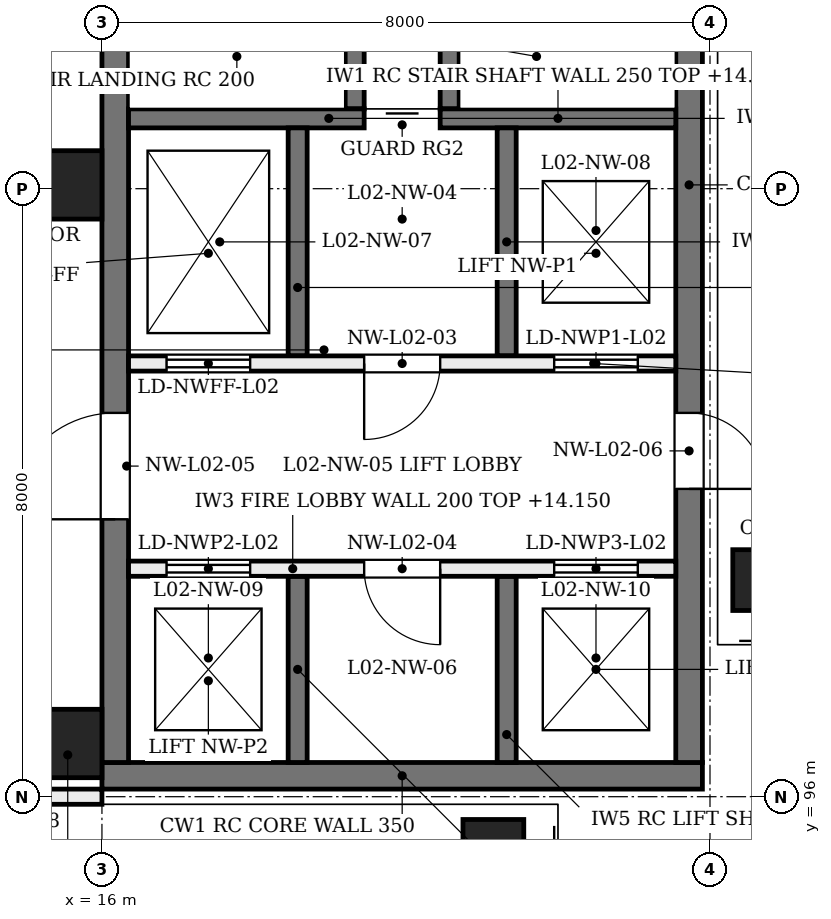
"""IFC4 building model, lengths in metres.
Left out: names, types, materials, properties, quantities, classifications, styles, units other than length and angle.
Written with IfcOpenShell. Run it as: python <this file> out.ifc"""

import sys

from ifc_helpers import new_model, si_unit, direction, frame, frame_2d, origin, origin_2d, place, context, subcontext, project, spatial, rectangle, extrude, element, fill, save


model = new_model("IFC4")
c1 = context("Model", 3, precision=1e-05, world=origin(), true_north=direction((0.0, 1.0)))
c2 = subcontext(c1, "Body", "Model", "MODEL_VIEW")
j1 = project(units=[si_unit("LENGTHUNIT", "METRE"), si_unit("PLANEANGLEUNIT", "RADIAN")], contexts=[c1])
p1 = place(None, origin())
s1 = spatial("IfcSite", under=j1, at=p1, CompositionType="ELEMENT")
p2 = place(p1, origin())
s2 = spatial("IfcBuilding", under=s1, at=p2, CompositionType="ELEMENT")
p3 = place(p2, frame((0.0, 0.0, 9.6)))
s3 = spatial("IfcBuildingStorey", under=s2, at=p3, CompositionType="ELEMENT", Elevation=9.6)
p4 = place(p3, frame((16.0, 96.275, 0.0), z_axis=(0.0, 0.0, 1.0), x_axis=(1.0, 0.0, 0.0)))
e1 = element("IfcWall", 1, at=p4, inside=s3, PredefinedType="SHEAR", context=c2, shape_type="SweptSolid", body=[
    extrude(rectangle(XDim=7.9, YDim=0.35, at=frame_2d((3.95, 0.0))), origin(), (0.0, 0.0, 1.0), 4.58),
])
p5 = place(p3, frame((16.175, 96.45, 0.0), z_axis=(0.0, 0.0, 1.0), x_axis=(0.0, 1.0, 0.0)))
e2 = element("IfcWall", 2, at=p5, inside=s3, PredefinedType="SHEAR", context=c2, shape_type="SweptSolid", body=[
    extrude(rectangle(XDim=15.2, YDim=0.35, at=frame_2d((7.6, 0.0))), origin(), (0.0, 0.0, 1.0), 4.58),
])
p6 = place(p5, frame((13.25, 0.0, 0.0)))
e3 = element("IfcOpeningElement", 3, at=p6, cuts=e2, PredefinedType="OPENING", context=c2, shape_type="SweptSolid", body=[
    extrude(rectangle(XDim=1.0, YDim=2.1, at=frame_2d((0.5, 1.05))), frame((0.0, 0.185, 0.0), z_axis=(0.0, -1.0, 0.0), x_axis=(1.0, 0.0, 0.0)), (0.0, 0.0, 1.0), 0.37),
])
p7 = place(p5, frame((3.2, 0.0, 0.0)))
e4 = element("IfcOpeningElement", 4, at=p7, cuts=e2, PredefinedType="OPENING", context=c2, shape_type="SweptSolid", body=[
    extrude(rectangle(XDim=1.4, YDim=2.1, at=frame_2d((0.7, 1.05))), frame((0.0, 0.185, 0.0), z_axis=(0.0, -1.0, 0.0), x_axis=(1.0, 0.0, 0.0)), (0.0, 0.0, 1.0), 0.37),
])
p8 = place(p3, frame((23.725, 96.45, 0.0), z_axis=(0.0, 0.0, 1.0), x_axis=(0.0, 1.0, 0.0)))
e5 = element("IfcWall", 5, at=p8, inside=s3, PredefinedType="SHEAR", context=c2, shape_type="SweptSolid", body=[
    extrude(rectangle(XDim=15.2, YDim=0.35, at=frame_2d((7.6, 0.0))), origin(), (0.0, 0.0, 1.0), 4.58),
])
p9 = place(p8, frame((13.25, 0.0, 0.0)))
e6 = element("IfcOpeningElement", 6, at=p9, cuts=e5, PredefinedType="OPENING", context=c2, shape_type="SweptSolid", body=[
    extrude(rectangle(XDim=1.0, YDim=2.1, at=frame_2d((0.5, 1.05))), frame((0.0, 0.185, 0.0), z_axis=(0.0, -1.0, 0.0), x_axis=(1.0, 0.0, 0.0)), (0.0, 0.0, 1.0), 0.37),
])
p10 = place(p8, frame((3.6, 0.0, 0.0)))
e7 = element("IfcOpeningElement", 7, at=p10, cuts=e5, PredefinedType="OPENING", context=c2, shape_type="SweptSolid", body=[
    extrude(rectangle(XDim=1.0, YDim=2.1, at=frame_2d((0.5, 1.05))), frame((0.0, 0.185, 0.0), z_axis=(0.0, -1.0, 0.0), x_axis=(1.0, 0.0, 0.0)), (0.0, 0.0, 1.0), 0.37),
])
for number, where, z_axis, x_axis in (
    (8, (15.55, 96.7, 0.0), (0.0, 0.0, 1.0), (1.0, 0.0, 0.0)),
    (9, (15.55, 104.05, 0.0), (0.0, 0.0, 1.0), (1.0, 0.0, 0.0)),
):
    element("IfcColumn", number, at=place(p3, frame(where, z_axis=z_axis, x_axis=x_axis)), inside=s3, PredefinedType="COLUMN", context=c2, shape_type="SweptSolid", body=[
        extrude(rectangle(XDim=0.9, YDim=0.9, at=origin_2d()), origin(), (0.0, 0.0, 1.0), 4.8),
    ])
for number, where, z_axis, x_axis in (
    (10, (24.7, 98.6, 0.0), (0.0, 0.204, 0.979), (-1.0, 0.0, 0.0)),
    (11, (24.7, 106.0, 0.0), (0.0, 0.204, 0.979), (-1.0, 0.0, 0.0)),
    (12, (21.4, 95.3, 0.0), (-0.204, 0.0, 0.979), (0.0, -1.0, 0.0)),
):
    element("IfcColumn", number, at=place(p3, frame(where, z_axis=z_axis, x_axis=x_axis)), inside=s3, PredefinedType="COLUMN", context=c2, shape_type="SweptSolid", body=[
        extrude(rectangle(XDim=0.8, YDim=0.8, at=origin_2d()), origin(), (0.0, 0.0, 1.0), 4.903),
    ])
for number, where, z_axis, x_axis in (
    (13, (19.325, 111.65, 0.0), (0.0, 0.0, 1.0), (0.0, -1.0, 0.0)),
    (14, (20.575, 111.65, 0.0), (0.0, 0.0, 1.0), (0.0, -1.0, 0.0)),
):
    element("IfcWall", number, at=place(p3, frame(where, z_axis=z_axis, x_axis=x_axis)), inside=s3, PredefinedType="SOLIDWALL", context=c2, shape_type="SweptSolid", body=[
        extrude(rectangle(XDim=6.6, YDim=0.25, at=frame_2d((3.3, 0.0))), origin(), (0.0, 0.0, 1.0), 4.55),
    ])
p11 = place(p3, frame((16.35, 104.925, 0.0), z_axis=(0.0, 0.0, 1.0), x_axis=(1.0, 0.0, 0.0)))
e15 = element("IfcWall", 15, at=p11, inside=s3, PredefinedType="SOLIDWALL", context=c2, shape_type="SweptSolid", body=[
    extrude(rectangle(XDim=3.1, YDim=0.25, at=frame_2d((1.55, 0.0))), origin(), (0.0, 0.0, 1.0), 4.55),
])
p12 = place(p3, frame((20.45, 104.925, 0.0), z_axis=(0.0, 0.0, 1.0), x_axis=(1.0, 0.0, 0.0)))
e16 = element("IfcWall", 16, at=p12, inside=s3, PredefinedType="SOLIDWALL", context=c2, shape_type="SweptSolid", body=[
    extrude(rectangle(XDim=3.1, YDim=0.25, at=frame_2d((1.55, 0.0))), origin(), (0.0, 0.0, 1.0), 4.55),
])
p13 = place(p3, frame((18.575, 104.8, 0.0), z_axis=(0.0, 0.0, 1.0), x_axis=(0.0, -1.0, 0.0)))
e17 = element("IfcWall", 17, at=p13, inside=s3, PredefinedType="SOLIDWALL", context=c2, shape_type="SweptSolid", body=[
    extrude(rectangle(XDim=3.0, YDim=0.25, at=frame_2d((1.5, 0.0))), origin(), (0.0, 0.0, 1.0), 4.55),
])
p14 = place(p3, frame((18.575, 98.9, 0.0), z_axis=(0.0, 0.0, 1.0), x_axis=(0.0, -1.0, 0.0)))
e18 = element("IfcWall", 18, at=p14, inside=s3, PredefinedType="SOLIDWALL", context=c2, shape_type="SweptSolid", body=[
    extrude(rectangle(XDim=2.45, YDim=0.25, at=frame_2d((1.225, 0.0))), origin(), (0.0, 0.0, 1.0), 4.55),
])
p15 = place(p3, frame((21.325, 104.8, 0.0), z_axis=(0.0, 0.0, 1.0), x_axis=(0.0, -1.0, 0.0)))
e19 = element("IfcWall", 19, at=p15, inside=s3, PredefinedType="SOLIDWALL", context=c2, shape_type="SweptSolid", body=[
    extrude(rectangle(XDim=3.0, YDim=0.25, at=frame_2d((1.5, 0.0))), origin(), (0.0, 0.0, 1.0), 4.55),
])
p16 = place(p3, frame((21.325, 98.9, 0.0), z_axis=(0.0, 0.0, 1.0), x_axis=(0.0, -1.0, 0.0)))
e20 = element("IfcWall", 20, at=p16, inside=s3, PredefinedType="SOLIDWALL", context=c2, shape_type="SweptSolid", body=[
    extrude(rectangle(XDim=2.45, YDim=0.25, at=frame_2d((1.225, 0.0))), origin(), (0.0, 0.0, 1.0), 4.55),
])
p17 = place(p3, frame((16.35, 101.7, 0.0), z_axis=(0.0, 0.0, 1.0), x_axis=(1.0, 0.0, 0.0)))
e21 = element("IfcWall", 21, at=p17, inside=s3, PredefinedType="SOLIDWALL", context=c2, shape_type="SweptSolid", body=[
    extrude(rectangle(XDim=7.2, YDim=0.2, at=frame_2d((3.6, 0.0))), origin(), (0.0, 0.0, 1.0), 4.55),
])
p18 = place(p17, frame((0.5, 0.0, 0.0)))
e22 = element("IfcOpeningElement", 22, at=p18, cuts=e21, PredefinedType="OPENING", context=c2, shape_type="SweptSolid", body=[
    extrude(rectangle(XDim=1.1, YDim=2.1, at=frame_2d((0.55, 1.05))), frame((0.0, 0.11, 0.0), z_axis=(0.0, -1.0, 0.0), x_axis=(1.0, 0.0, 0.0)), (0.0, 0.0, 1.0), 0.22),
])
p19 = place(p17, frame((5.6, 0.0, 0.0)))
e23 = element("IfcOpeningElement", 23, at=p19, cuts=e21, PredefinedType="OPENING", context=c2, shape_type="SweptSolid", body=[
    extrude(rectangle(XDim=1.1, YDim=2.1, at=frame_2d((0.55, 1.05))), frame((0.0, 0.11, 0.0), z_axis=(0.0, -1.0, 0.0), x_axis=(1.0, 0.0, 0.0)), (0.0, 0.0, 1.0), 0.22),
])
p20 = place(p17, frame((3.1, 0.0, 0.0)))
e24 = element("IfcOpeningElement", 24, at=p20, cuts=e21, PredefinedType="OPENING", context=c2, shape_type="SweptSolid", body=[
    extrude(rectangle(XDim=1.0, YDim=2.1, at=frame_2d((0.5, 1.05))), frame((0.0, 0.11, 0.0), z_axis=(0.0, -1.0, 0.0), x_axis=(1.0, 0.0, 0.0)), (0.0, 0.0, 1.0), 0.22),
])
p21 = place(p3, frame((16.35, 99.0, 0.0), z_axis=(0.0, 0.0, 1.0), x_axis=(1.0, 0.0, 0.0)))
e25 = element("IfcWall", 25, at=p21, inside=s3, PredefinedType="SOLIDWALL", context=c2, shape_type="SweptSolid", body=[
    extrude(rectangle(XDim=7.2, YDim=0.2, at=frame_2d((3.6, 0.0))), origin(), (0.0, 0.0, 1.0), 4.55),
])
p22 = place(p21, frame((0.5, 0.0, 0.0)))
e26 = element("IfcOpeningElement", 26, at=p22, cuts=e25, PredefinedType="OPENING", context=c2, shape_type="SweptSolid", body=[
    extrude(rectangle(XDim=1.1, YDim=2.1, at=frame_2d((0.55, 1.05))), frame((0.0, 0.11, 0.0), z_axis=(0.0, -1.0, 0.0), x_axis=(1.0, 0.0, 0.0)), (0.0, 0.0, 1.0), 0.22),
])
p23 = place(p21, frame((5.6, 0.0, 0.0)))
e27 = element("IfcOpeningElement", 27, at=p23, cuts=e25, PredefinedType="OPENING", context=c2, shape_type="SweptSolid", body=[
    extrude(rectangle(XDim=1.1, YDim=2.1, at=frame_2d((0.55, 1.05))), frame((0.0, 0.11, 0.0), z_axis=(0.0, -1.0, 0.0), x_axis=(1.0, 0.0, 0.0)), (0.0, 0.0, 1.0), 0.22),
])
p24 = place(p21, frame((3.1, 0.0, 0.0)))
e28 = element("IfcOpeningElement", 28, at=p24, cuts=e25, PredefinedType="OPENING", context=c2, shape_type="SweptSolid", body=[
    extrude(rectangle(XDim=1.0, YDim=2.1, at=frame_2d((0.5, 1.05))), frame((0.0, 0.11, 0.0), z_axis=(0.0, -1.0, 0.0), x_axis=(1.0, 0.0, 0.0)), (0.0, 0.0, 1.0), 0.22),
])
p25 = place(p3, frame((12.4, 96.0, 0.0), z_axis=(0.0, 0.0, 1.0), x_axis=(1.0, 0.0, 0.0)))
e29 = element("IfcWall", 29, at=p25, inside=s3, PredefinedType="PARTITIONING", context=c2, shape_type="SweptSolid", body=[
    extrude(rectangle(XDim=3.6, YDim=0.2, at=frame_2d((1.8, 0.0))), origin(), (0.0, 0.0, 1.0), 3.88),
])
p26 = place(p25, frame((1.8, 0.0, 0.0)))
e30 = element("IfcOpeningElement", 30, at=p26, cuts=e29, PredefinedType="OPENING", context=c2, shape_type="SweptSolid", body=[
    extrude(rectangle(XDim=0.9, YDim=2.1, at=frame_2d((0.45, 1.05))), frame((0.0, 0.11, 0.0), z_axis=(0.0, -1.0, 0.0), x_axis=(1.0, 0.0, 0.0)), (0.0, 0.0, 1.0), 0.22),
])
p27 = place(p18, frame((1.1, 0.0, 0.0), z_axis=(0.0, 0.0, 1.0), x_axis=(-1.0, 0.0, 0.0)))
e31 = element("IfcDoor", 31, at=p27, inside=s3, OperationType="DOUBLE_DOOR_SLIDING", PredefinedType="DOOR", context=c2, shape_type="SweptSolid", body=[
    extrude(rectangle(XDim=1.1, YDim=2.1, at=frame_2d((0.55, 1.05))), frame((0.0, 0.025, 0.0), z_axis=(0.0, -1.0, 0.0), x_axis=(1.0, 0.0, 0.0)), (0.0, 0.0, 1.0), 0.05),
])
fill(e22, e31)
p28 = place(p19, frame((1.1, 0.0, 0.0), z_axis=(0.0, 0.0, 1.0), x_axis=(-1.0, 0.0, 0.0)))
e32 = element("IfcDoor", 32, at=p28, inside=s3, OperationType="DOUBLE_DOOR_SLIDING", PredefinedType="DOOR", context=c2, shape_type="SweptSolid", body=[
    extrude(rectangle(XDim=1.1, YDim=2.1, at=frame_2d((0.55, 1.05))), frame((0.0, 0.025, 0.0), z_axis=(0.0, -1.0, 0.0), x_axis=(1.0, 0.0, 0.0)), (0.0, 0.0, 1.0), 0.05),
])
fill(e23, e32)
p29 = place(p22, origin())
e33 = element("IfcDoor", 33, at=p29, inside=s3, OperationType="DOUBLE_DOOR_SLIDING", PredefinedType="DOOR", context=c2, shape_type="SweptSolid", body=[
    extrude(rectangle(XDim=1.1, YDim=2.1, at=frame_2d((0.55, 1.05))), frame((0.0, 0.025, 0.0), z_axis=(0.0, -1.0, 0.0), x_axis=(1.0, 0.0, 0.0)), (0.0, 0.0, 1.0), 0.05),
])
fill(e26, e33)
p30 = place(p23, origin())
e34 = element("IfcDoor", 34, at=p30, inside=s3, OperationType="DOUBLE_DOOR_SLIDING", PredefinedType="DOOR", context=c2, shape_type="SweptSolid", body=[
    extrude(rectangle(XDim=1.1, YDim=2.1, at=frame_2d((0.55, 1.05))), frame((0.0, 0.025, 0.0), z_axis=(0.0, -1.0, 0.0), x_axis=(1.0, 0.0, 0.0)), (0.0, 0.0, 1.0), 0.05),
])
fill(e27, e34)
p31 = place(p20, frame((1.0, 0.0, 0.0), z_axis=(0.0, 0.0, 1.0), x_axis=(-1.0, 0.0, 0.0)))
e35 = element("IfcDoor", 35, at=p31, inside=s3, OperationType="SINGLE_SWING_LEFT", PredefinedType="DOOR", context=c2, shape_type="SweptSolid", body=[
    extrude(rectangle(XDim=1.0, YDim=2.1, at=frame_2d((0.5, 1.05))), frame((0.0, 0.025, 0.0), z_axis=(0.0, -1.0, 0.0), x_axis=(1.0, 0.0, 0.0)), (0.0, 0.0, 1.0), 0.05),
])
fill(e24, e35)
p32 = place(p24, origin())
e36 = element("IfcDoor", 36, at=p32, inside=s3, OperationType="SINGLE_SWING_RIGHT", PredefinedType="DOOR", context=c2, shape_type="SweptSolid", body=[
    extrude(rectangle(XDim=1.0, YDim=2.1, at=frame_2d((0.5, 1.05))), frame((0.0, 0.025, 0.0), z_axis=(0.0, -1.0, 0.0), x_axis=(1.0, 0.0, 0.0)), (0.0, 0.0, 1.0), 0.05),
])
fill(e28, e36)
p33 = place(p7, origin())
e37 = element("IfcDoor", 37, at=p33, inside=s3, OperationType="SINGLE_SWING_LEFT", PredefinedType="DOOR", context=c2, shape_type="SweptSolid", body=[
    extrude(rectangle(XDim=1.4, YDim=2.1, at=frame_2d((0.7, 1.05))), frame((0.0, 0.025, 0.0), z_axis=(0.0, -1.0, 0.0), x_axis=(1.0, 0.0, 0.0)), (0.0, 0.0, 1.0), 0.05),
])
fill(e4, e37)
p34 = place(p10, frame((1.0, 0.0, 0.0), z_axis=(0.0, 0.0, 1.0), x_axis=(-1.0, 0.0, 0.0)))
e38 = element("IfcDoor", 38, at=p34, inside=s3, OperationType="SINGLE_SWING_LEFT", PredefinedType="DOOR", context=c2, shape_type="SweptSolid", body=[
    extrude(rectangle(XDim=1.0, YDim=2.1, at=frame_2d((0.5, 1.05))), frame((0.0, 0.025, 0.0), z_axis=(0.0, -1.0, 0.0), x_axis=(1.0, 0.0, 0.0)), (0.0, 0.0, 1.0), 0.05),
])
fill(e7, e38)
save(model, sys.argv[1])
